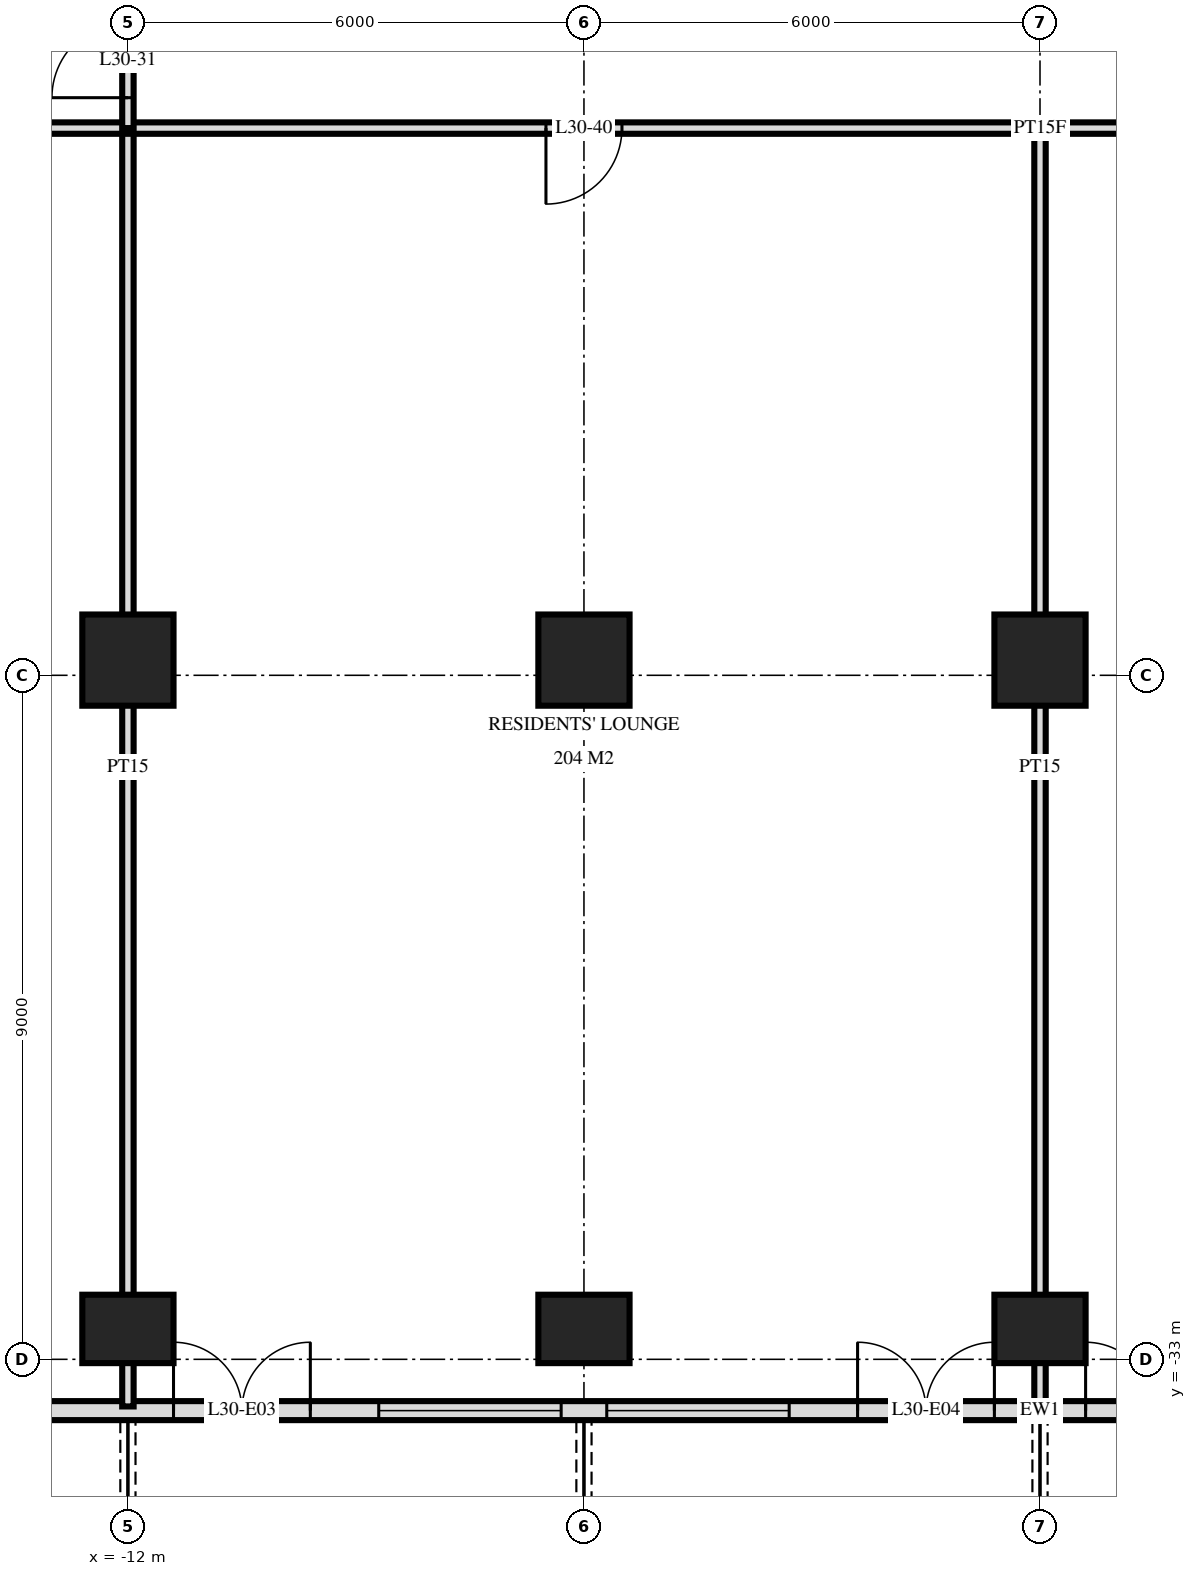
"""IFC4 building model, lengths in metres.
Left out: names, types, materials, properties, quantities, classifications, styles, units other than length and angle.
Written with IfcOpenShell. Run it as: python <this file> out.ifc"""

import sys

from ifc_helpers import new_model, si_unit, direction, frame, frame_2d, origin, origin_2d, place, context, subcontext, project, spatial, rectangle, extrude, element, fill, save


model = new_model("IFC4")
c1 = context("Model", 3, precision=1e-05, world=origin(), true_north=direction((0.0, 1.0)))
c2 = subcontext(c1, "Body", "Model", "MODEL_VIEW")
j1 = project(units=[si_unit("LENGTHUNIT", "METRE"), si_unit("PLANEANGLEUNIT", "RADIAN")], contexts=[c1])
p1 = place(None, origin())
s1 = spatial("IfcSite", under=j1, at=p1, CompositionType="ELEMENT")
p2 = place(p1, origin())
s2 = spatial("IfcBuilding", under=s1, at=p2, CompositionType="ELEMENT")
p3 = place(p2, frame((0.0, 0.0, 120.0)))
s3 = spatial("IfcBuildingStorey", under=s2, at=p3, CompositionType="ELEMENT", Elevation=120.0)
p4 = place(p3, frame((-12.0, -32.6, 0.0), z_axis=(0.0, 0.0, 1.0), x_axis=(1.0, 0.0, 0.0)))
e1 = element("IfcColumn", 1, at=p4, inside=s3, PredefinedType="COLUMN", context=c2, shape_type="SweptSolid", body=[
    extrude(rectangle(XDim=1.2, YDim=0.9, at=origin_2d()), origin(), (0.0, 0.0, 1.0), 3.6),
])
p5 = place(p3, frame((-12.0, -23.8, 0.0), z_axis=(0.0, 0.0, 1.0), x_axis=(1.0, 0.0, 0.0)))
e2 = element("IfcColumn", 2, at=p5, inside=s3, PredefinedType="COLUMN", context=c2, shape_type="SweptSolid", body=[
    extrude(rectangle(XDim=1.2, YDim=1.2, at=origin_2d()), origin(), (0.0, 0.0, 1.0), 3.6),
])
p6 = place(p3, frame((-6.0, -32.6, 0.0), z_axis=(0.0, 0.0, 1.0), x_axis=(1.0, 0.0, 0.0)))
e3 = element("IfcColumn", 3, at=p6, inside=s3, PredefinedType="COLUMN", context=c2, shape_type="SweptSolid", body=[
    extrude(rectangle(XDim=1.2, YDim=0.9, at=origin_2d()), origin(), (0.0, 0.0, 1.0), 3.6),
])
p7 = place(p3, frame((-6.0, -23.8, 0.0), z_axis=(0.0, 0.0, 1.0), x_axis=(1.0, 0.0, 0.0)))
e4 = element("IfcColumn", 4, at=p7, inside=s3, PredefinedType="COLUMN", context=c2, shape_type="SweptSolid", body=[
    extrude(rectangle(XDim=1.2, YDim=1.2, at=origin_2d()), origin(), (0.0, 0.0, 1.0), 3.6),
])
p8 = place(p3, frame((0.0, -32.6, 0.0), z_axis=(0.0, 0.0, 1.0), x_axis=(1.0, 0.0, 0.0)))
e5 = element("IfcColumn", 5, at=p8, inside=s3, PredefinedType="COLUMN", context=c2, shape_type="SweptSolid", body=[
    extrude(rectangle(XDim=1.2, YDim=0.9, at=origin_2d()), origin(), (0.0, 0.0, 1.0), 3.6),
])
p9 = place(p3, frame((0.0, -23.8, 0.0), z_axis=(0.0, 0.0, 1.0), x_axis=(1.0, 0.0, 0.0)))
e6 = element("IfcColumn", 6, at=p9, inside=s3, PredefinedType="COLUMN", context=c2, shape_type="SweptSolid", body=[
    extrude(rectangle(XDim=1.2, YDim=1.2, at=origin_2d()), origin(), (0.0, 0.0, 1.0), 3.6),
])
p10 = place(p3, frame((-23.675, -33.675, 0.0), z_axis=(0.0, 0.0, 1.0), x_axis=(1.0, 0.0, 0.0)))
e7 = element("IfcWall", 7, at=p10, inside=s3, PredefinedType="SOLIDWALL", context=c2, shape_type="SweptSolid", body=[
    extrude(rectangle(XDim=47.351, YDim=0.25, at=frame_2d((23.675, 0.0))), origin(), (0.0, 0.0, 1.0), 3.32),
])
p11 = place(p10, frame((0.275, 0.0, 0.3)))
e8 = element("IfcOpeningElement", 8, at=p11, cuts=e7, PredefinedType="OPENING", context=c2, shape_type="SweptSolid", body=[
    extrude(rectangle(XDim=2.4, YDim=2.1, at=frame_2d((1.2, 1.05))), frame((0.0, 0.135, 0.0), z_axis=(0.0, -1.0, 0.0), x_axis=(1.0, 0.0, 0.0)), (0.0, 0.0, 1.0), 0.27),
])
p12 = place(p10, frame((3.425, 0.0, 0.0)))
e9 = element("IfcOpeningElement", 9, at=p12, cuts=e7, PredefinedType="OPENING", context=c2, shape_type="SweptSolid", body=[
    extrude(rectangle(XDim=1.8, YDim=2.4, at=frame_2d((0.9, 1.2))), frame((0.0, 0.135, 0.0), z_axis=(0.0, -1.0, 0.0), x_axis=(1.0, 0.0, 0.0)), (0.0, 0.0, 1.0), 0.27),
])
p13 = place(p10, frame((7.775, 0.0, 0.0)))
e10 = element("IfcOpeningElement", 10, at=p13, cuts=e7, PredefinedType="OPENING", context=c2, shape_type="SweptSolid", body=[
    extrude(rectangle(XDim=1.8, YDim=2.4, at=frame_2d((0.9, 1.2))), frame((0.0, 0.135, 0.0), z_axis=(0.0, -1.0, 0.0), x_axis=(1.0, 0.0, 0.0)), (0.0, 0.0, 1.0), 0.27),
])
p14 = place(p10, frame((12.275, 0.0, 0.0)))
e11 = element("IfcOpeningElement", 11, at=p14, cuts=e7, PredefinedType="OPENING", context=c2, shape_type="SweptSolid", body=[
    extrude(rectangle(XDim=1.8, YDim=2.4, at=frame_2d((0.9, 1.2))), frame((0.0, 0.135, 0.0), z_axis=(0.0, -1.0, 0.0), x_axis=(1.0, 0.0, 0.0)), (0.0, 0.0, 1.0), 0.27),
])
p15 = place(p10, frame((14.975, 0.0, 0.3)))
e12 = element("IfcOpeningElement", 12, at=p15, cuts=e7, PredefinedType="OPENING", context=c2, shape_type="SweptSolid", body=[
    extrude(rectangle(XDim=2.4, YDim=2.1, at=frame_2d((1.2, 1.05))), frame((0.0, 0.135, 0.0), z_axis=(0.0, -1.0, 0.0), x_axis=(1.0, 0.0, 0.0)), (0.0, 0.0, 1.0), 0.27),
])
p16 = place(p10, frame((17.975, 0.0, 0.3)))
e13 = element("IfcOpeningElement", 13, at=p16, cuts=e7, PredefinedType="OPENING", context=c2, shape_type="SweptSolid", body=[
    extrude(rectangle(XDim=2.4, YDim=2.1, at=frame_2d((1.2, 1.05))), frame((0.0, 0.135, 0.0), z_axis=(0.0, -1.0, 0.0), x_axis=(1.0, 0.0, 0.0)), (0.0, 0.0, 1.0), 0.27),
])
p17 = place(p10, frame((21.275, 0.0, 0.0)))
e14 = element("IfcOpeningElement", 14, at=p17, cuts=e7, PredefinedType="OPENING", context=c2, shape_type="SweptSolid", body=[
    extrude(rectangle(XDim=1.8, YDim=2.4, at=frame_2d((0.9, 1.2))), frame((0.0, 0.135, 0.0), z_axis=(0.0, -1.0, 0.0), x_axis=(1.0, 0.0, 0.0)), (0.0, 0.0, 1.0), 0.27),
])
p18 = place(p10, frame((24.275, 0.0, 0.0)))
e15 = element("IfcOpeningElement", 15, at=p18, cuts=e7, PredefinedType="OPENING", context=c2, shape_type="SweptSolid", body=[
    extrude(rectangle(XDim=1.8, YDim=2.4, at=frame_2d((0.9, 1.2))), frame((0.0, 0.135, 0.0), z_axis=(0.0, -1.0, 0.0), x_axis=(1.0, 0.0, 0.0)), (0.0, 0.0, 1.0), 0.27),
])
p19 = place(p10, frame((26.975, 0.0, 0.3)))
e16 = element("IfcOpeningElement", 16, at=p19, cuts=e7, PredefinedType="OPENING", context=c2, shape_type="SweptSolid", body=[
    extrude(rectangle(XDim=2.4, YDim=2.1, at=frame_2d((1.2, 1.05))), frame((0.0, 0.135, 0.0), z_axis=(0.0, -1.0, 0.0), x_axis=(1.0, 0.0, 0.0)), (0.0, 0.0, 1.0), 0.27),
])
p20 = place(p10, frame((30.275, 0.0, 0.0)))
e17 = element("IfcOpeningElement", 17, at=p20, cuts=e7, PredefinedType="OPENING", context=c2, shape_type="SweptSolid", body=[
    extrude(rectangle(XDim=1.8, YDim=2.4, at=frame_2d((0.9, 1.2))), frame((0.0, 0.135, 0.0), z_axis=(0.0, -1.0, 0.0), x_axis=(1.0, 0.0, 0.0)), (0.0, 0.0, 1.0), 0.27),
])
p21 = place(p10, frame((32.975, 0.0, 0.3)))
e18 = element("IfcOpeningElement", 18, at=p21, cuts=e7, PredefinedType="OPENING", context=c2, shape_type="SweptSolid", body=[
    extrude(rectangle(XDim=2.4, YDim=2.1, at=frame_2d((1.2, 1.05))), frame((0.0, 0.135, 0.0), z_axis=(0.0, -1.0, 0.0), x_axis=(1.0, 0.0, 0.0)), (0.0, 0.0, 1.0), 0.27),
])
p22 = place(p10, frame((35.975, 0.0, 0.3)))
e19 = element("IfcOpeningElement", 19, at=p22, cuts=e7, PredefinedType="OPENING", context=c2, shape_type="SweptSolid", body=[
    extrude(rectangle(XDim=2.4, YDim=2.1, at=frame_2d((1.2, 1.05))), frame((0.0, 0.135, 0.0), z_axis=(0.0, -1.0, 0.0), x_axis=(1.0, 0.0, 0.0)), (0.0, 0.0, 1.0), 0.27),
])
p23 = place(p10, frame((39.275, 0.0, 0.0)))
e20 = element("IfcOpeningElement", 20, at=p23, cuts=e7, PredefinedType="OPENING", context=c2, shape_type="SweptSolid", body=[
    extrude(rectangle(XDim=1.8, YDim=2.4, at=frame_2d((0.9, 1.2))), frame((0.0, 0.135, 0.0), z_axis=(0.0, -1.0, 0.0), x_axis=(1.0, 0.0, 0.0)), (0.0, 0.0, 1.0), 0.27),
])
p24 = place(p10, frame((41.975, 0.0, 0.3)))
e21 = element("IfcOpeningElement", 21, at=p24, cuts=e7, PredefinedType="OPENING", context=c2, shape_type="SweptSolid", body=[
    extrude(rectangle(XDim=2.4, YDim=2.1, at=frame_2d((1.2, 1.05))), frame((0.0, 0.135, 0.0), z_axis=(0.0, -1.0, 0.0), x_axis=(1.0, 0.0, 0.0)), (0.0, 0.0, 1.0), 0.27),
])
p25 = place(p10, frame((45.125, 0.0, 0.0)))
e22 = element("IfcOpeningElement", 22, at=p25, cuts=e7, PredefinedType="OPENING", context=c2, shape_type="SweptSolid", body=[
    extrude(rectangle(XDim=1.8, YDim=2.4, at=frame_2d((0.9, 1.2))), frame((0.0, 0.135, 0.0), z_axis=(0.0, -1.0, 0.0), x_axis=(1.0, 0.0, 0.0)), (0.0, 0.0, 1.0), 0.27),
])
p26 = place(p3, frame((0.0, -33.62, 0.0), z_axis=(0.0, 0.0, 1.0), x_axis=(0.0, 1.0, 0.0)))
e23 = element("IfcWall", 23, at=p26, inside=s3, PredefinedType="PARTITIONING", context=c2, shape_type="SweptSolid", body=[
    extrude(rectangle(XDim=16.82, YDim=0.15, at=frame_2d((8.41, 0.0))), origin(), (0.0, 0.0, 1.0), 3.32),
])
p27 = place(p3, frame((-12.0, -16.8, 0.0), z_axis=(0.0, 0.0, 1.0), x_axis=(0.0, 1.0, 0.0)))
e24 = element("IfcWall", 24, at=p27, inside=s3, PredefinedType="PARTITIONING", context=c2, shape_type="SweptSolid", body=[
    extrude(rectangle(XDim=1.75, YDim=0.15, at=frame_2d((0.875, 0.0))), origin(), (0.0, 0.0, 1.0), 3.32),
])
p28 = place(p27, frame((0.4, 0.0, 0.0)))
e25 = element("IfcOpeningElement", 25, at=p28, cuts=e24, PredefinedType="OPENING", context=c2, shape_type="SweptSolid", body=[
    extrude(rectangle(XDim=1.0, YDim=2.1, at=frame_2d((0.5, 1.05))), frame((0.0, 0.085, 0.0), z_axis=(0.0, -1.0, 0.0), x_axis=(1.0, 0.0, 0.0)), (0.0, 0.0, 1.0), 0.17),
])
p29 = place(p3, frame((-12.0, -33.62, 0.0), z_axis=(0.0, 0.0, 1.0), x_axis=(0.0, 1.0, 0.0)))
e26 = element("IfcWall", 26, at=p29, inside=s3, PredefinedType="PARTITIONING", context=c2, shape_type="SweptSolid", body=[
    extrude(rectangle(XDim=16.82, YDim=0.15, at=frame_2d((8.41, 0.0))), origin(), (0.0, 0.0, 1.0), 3.32),
])
p30 = place(p3, frame((-28.02, -16.8, 0.0), z_axis=(0.0, 0.0, 1.0), x_axis=(1.0, 0.0, 0.0)))
e27 = element("IfcWall", 27, at=p30, inside=s3, PredefinedType="PARTITIONING", context=c2, shape_type="SweptSolid", body=[
    extrude(rectangle(XDim=56.04, YDim=0.15, at=frame_2d((28.02, 0.0))), origin(), (0.0, 0.0, 1.0), 3.32),
])
p31 = place(p30, frame((12.52, 0.0, 0.0)))
e28 = element("IfcOpeningElement", 28, at=p31, cuts=e27, PredefinedType="OPENING", context=c2, shape_type="SweptSolid", body=[
    extrude(rectangle(XDim=1.0, YDim=2.1, at=frame_2d((0.5, 1.05))), frame((0.0, 0.085, 0.0), z_axis=(0.0, -1.0, 0.0), x_axis=(1.0, 0.0, 0.0)), (0.0, 0.0, 1.0), 0.17),
])
p32 = place(p30, frame((8.32, 0.0, 0.0)))
e29 = element("IfcOpeningElement", 29, at=p32, cuts=e27, PredefinedType="OPENING", context=c2, shape_type="SweptSolid", body=[
    extrude(rectangle(XDim=1.0, YDim=2.1, at=frame_2d((0.5, 1.05))), frame((0.0, 0.085, 0.0), z_axis=(0.0, -1.0, 0.0), x_axis=(1.0, 0.0, 0.0)), (0.0, 0.0, 1.0), 0.17),
])
p33 = place(p30, frame((40.42, 0.0, 0.0)))
e30 = element("IfcOpeningElement", 30, at=p33, cuts=e27, PredefinedType="OPENING", context=c2, shape_type="SweptSolid", body=[
    extrude(rectangle(XDim=1.0, YDim=2.1, at=frame_2d((0.5, 1.05))), frame((0.0, 0.085, 0.0), z_axis=(0.0, -1.0, 0.0), x_axis=(1.0, 0.0, 0.0)), (0.0, 0.0, 1.0), 0.17),
])
p34 = place(p30, frame((46.72, 0.0, 0.0)))
e31 = element("IfcOpeningElement", 31, at=p34, cuts=e27, PredefinedType="OPENING", context=c2, shape_type="SweptSolid", body=[
    extrude(rectangle(XDim=1.0, YDim=2.1, at=frame_2d((0.5, 1.05))), frame((0.0, 0.085, 0.0), z_axis=(0.0, -1.0, 0.0), x_axis=(1.0, 0.0, 0.0)), (0.0, 0.0, 1.0), 0.17),
])
p35 = place(p30, frame((21.52, 0.0, 0.0)))
e32 = element("IfcOpeningElement", 32, at=p35, cuts=e27, PredefinedType="OPENING", context=c2, shape_type="SweptSolid", body=[
    extrude(rectangle(XDim=1.0, YDim=2.1, at=frame_2d((0.5, 1.05))), frame((0.0, 0.085, 0.0), z_axis=(0.0, -1.0, 0.0), x_axis=(1.0, 0.0, 0.0)), (0.0, 0.0, 1.0), 0.17),
])
p36 = place(p30, frame((30.52, 0.0, 0.0)))
e33 = element("IfcOpeningElement", 33, at=p36, cuts=e27, PredefinedType="OPENING", context=c2, shape_type="SweptSolid", body=[
    extrude(rectangle(XDim=1.0, YDim=2.1, at=frame_2d((0.5, 1.05))), frame((0.0, 0.085, 0.0), z_axis=(0.0, -1.0, 0.0), x_axis=(1.0, 0.0, 0.0)), (0.0, 0.0, 1.0), 0.17),
])
p37 = place(p30, frame((36.52, 0.0, 0.0)))
e34 = element("IfcOpeningElement", 34, at=p37, cuts=e27, PredefinedType="OPENING", context=c2, shape_type="SweptSolid", body=[
    extrude(rectangle(XDim=1.0, YDim=2.1, at=frame_2d((0.5, 1.05))), frame((0.0, 0.085, 0.0), z_axis=(0.0, -1.0, 0.0), x_axis=(1.0, 0.0, 0.0)), (0.0, 0.0, 1.0), 0.17),
])
p38 = place(p14, origin())
e35 = element("IfcDoor", 35, at=p38, inside=s3, OperationType="DOUBLE_DOOR_SINGLE_SWING", PredefinedType="DOOR", context=c2, shape_type="SweptSolid", body=[
    extrude(rectangle(XDim=1.8, YDim=2.4, at=frame_2d((0.9, 1.2))), frame((0.0, 0.025, 0.0), z_axis=(0.0, -1.0, 0.0), x_axis=(1.0, 0.0, 0.0)), (0.0, 0.0, 1.0), 0.05),
])
fill(e11, e35)
p39 = place(p15, origin())
e36 = element("IfcWindow", 36, at=p39, inside=s3, PartitioningType="SINGLE_PANEL", PredefinedType="WINDOW", context=c2, shape_type="SweptSolid", body=[
    extrude(rectangle(XDim=2.4, YDim=2.1, at=frame_2d((1.2, 1.05))), frame((0.0, 0.03, 0.0), z_axis=(0.0, -1.0, 0.0), x_axis=(1.0, 0.0, 0.0)), (0.0, 0.0, 1.0), 0.06),
])
fill(e12, e36)
p40 = place(p16, origin())
e37 = element("IfcWindow", 37, at=p40, inside=s3, PartitioningType="SINGLE_PANEL", PredefinedType="WINDOW", context=c2, shape_type="SweptSolid", body=[
    extrude(rectangle(XDim=2.4, YDim=2.1, at=frame_2d((1.2, 1.05))), frame((0.0, 0.03, 0.0), z_axis=(0.0, -1.0, 0.0), x_axis=(1.0, 0.0, 0.0)), (0.0, 0.0, 1.0), 0.06),
])
fill(e13, e37)
p41 = place(p17, origin())
e38 = element("IfcDoor", 38, at=p41, inside=s3, OperationType="DOUBLE_DOOR_SINGLE_SWING", PredefinedType="DOOR", context=c2, shape_type="SweptSolid", body=[
    extrude(rectangle(XDim=1.8, YDim=2.4, at=frame_2d((0.9, 1.2))), frame((0.0, 0.025, 0.0), z_axis=(0.0, -1.0, 0.0), x_axis=(1.0, 0.0, 0.0)), (0.0, 0.0, 1.0), 0.05),
])
fill(e14, e38)
p42 = place(p18, origin())
e39 = element("IfcDoor", 39, at=p42, inside=s3, OperationType="DOUBLE_DOOR_SINGLE_SWING", PredefinedType="DOOR", context=c2, shape_type="SweptSolid", body=[
    extrude(rectangle(XDim=1.8, YDim=2.4, at=frame_2d((0.9, 1.2))), frame((0.0, 0.025, 0.0), z_axis=(0.0, -1.0, 0.0), x_axis=(1.0, 0.0, 0.0)), (0.0, 0.0, 1.0), 0.05),
])
fill(e15, e39)
p43 = place(p28, origin())
e40 = element("IfcDoor", 40, at=p43, inside=s3, OperationType="SINGLE_SWING_RIGHT", PredefinedType="DOOR", context=c2, shape_type="SweptSolid", body=[
    extrude(rectangle(XDim=1.0, YDim=2.1, at=frame_2d((0.5, 1.05))), frame((0.0, 0.025, 0.0), z_axis=(0.0, -1.0, 0.0), x_axis=(1.0, 0.0, 0.0)), (0.0, 0.0, 1.0), 0.05),
])
fill(e25, e40)
p44 = place(p35, frame((0.5, 0.0, 0.0), z_axis=(0.0, 0.0, 1.0), x_axis=(-1.0, 0.0, 0.0)))
e41 = element("IfcDoor", 41, at=p44, inside=s3, OperationType="SINGLE_SWING_LEFT", PredefinedType="DOOR", context=c2, shape_type="SweptSolid", body=[
    extrude(rectangle(XDim=1.0, YDim=2.1, at=frame_2d((0.0, 1.05))), frame((0.0, -0.025, 0.0), z_axis=(0.0, 1.0, 0.0), x_axis=(-1.0, 0.0, 0.0)), (0.0, 0.0, 1.0), 0.05),
])
fill(e32, e41)
save(model, sys.argv[1])
